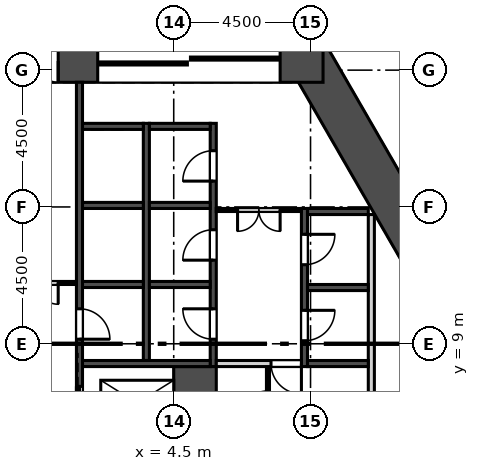
"""IFC4 building model, lengths in metres.
Left out: names, types, materials, properties, quantities, classifications, styles, units other than length and angle.
Written with IfcOpenShell. Run it as: python <this file> out.ifc"""

import sys

from ifc_helpers import new_model, si_unit, direction, frame, frame_2d, origin, place, context, subcontext, project, spatial, rectangle, extrude, element, fill, save


model = new_model("IFC4")
c1 = context("Model", 3, precision=1e-05, world=origin(), true_north=direction((0.0, 1.0)))
c2 = subcontext(c1, "Body", "Model", "MODEL_VIEW")
j1 = project(units=[si_unit("LENGTHUNIT", "METRE"), si_unit("PLANEANGLEUNIT", "RADIAN")], contexts=[c1])
p1 = place(None, origin())
s1 = spatial("IfcSite", under=j1, at=p1, CompositionType="ELEMENT")
p2 = place(p1, origin())
s2 = spatial("IfcBuilding", under=s1, at=p2, CompositionType="ELEMENT")
p3 = place(p2, frame((0.0, 0.0, 47.5)))
s3 = spatial("IfcBuildingStorey", under=s2, at=p3, CompositionType="ELEMENT", Elevation=47.5)
p4 = place(p3, frame((13.394, 10.703, 0.0), z_axis=(0.0, 0.0, 1.0), x_axis=(-0.50000187635, 0.866024320471, 0.0)))
e1 = element("IfcWall", 1, at=p4, inside=s3, PredefinedType="SHEAR", context=c2, shape_type="SweptSolid", body=[
    extrude(rectangle(XDim=9.177, YDim=1.4, at=frame_2d((4.588, 0.0))), origin(), (0.0, 0.0, 1.0), 5.4),
])
p5 = place(p3, frame((9.412, 18.3, 0.0), z_axis=(0.0, 0.0, 1.0), x_axis=(-1.0, 0.0, 0.0)))
e2 = element("IfcWall", 2, at=p5, inside=s3, PredefinedType="SHEAR", context=c2, shape_type="SweptSolid", body=[
    extrude(rectangle(XDim=18.823, YDim=1.4, at=frame_2d((9.412, 0.0))), origin(), (0.0, 0.0, 1.0), 5.4),
])
p6 = place(p5, frame((8.711, 0.0, 0.0)))
e3 = element("IfcOpeningElement", 3, at=p6, cuts=e2, PredefinedType="OPENING", context=c2, shape_type="SweptSolid", body=[
    extrude(rectangle(XDim=1.4, YDim=2.1, at=frame_2d((0.7, 1.05))), frame((0.0, 0.71, 0.0), z_axis=(0.0, -1.0, 0.0), x_axis=(1.0, 0.0, 0.0)), (0.0, 0.0, 1.0), 1.42),
])
p7 = place(p5, frame((11.412, 0.0, 0.0)))
e4 = element("IfcOpeningElement", 4, at=p7, cuts=e2, PredefinedType="OPENING", context=c2, shape_type="SweptSolid", body=[
    extrude(rectangle(XDim=6.0, YDim=2.4, at=frame_2d((3.0, 1.2))), frame((0.0, 0.71, 0.0), z_axis=(0.0, -1.0, 0.0), x_axis=(1.0, 0.0, 0.0)), (0.0, 0.0, 1.0), 1.42),
])
p8 = place(p5, frame((1.412, 0.0, 0.0)))
e5 = element("IfcOpeningElement", 5, at=p8, cuts=e2, PredefinedType="OPENING", context=c2, shape_type="SweptSolid", body=[
    extrude(rectangle(XDim=6.0, YDim=2.4, at=frame_2d((3.0, 1.2))), frame((0.0, 0.71, 0.0), z_axis=(0.0, -1.0, 0.0), x_axis=(1.0, 0.0, 0.0)), (0.0, 0.0, 1.0), 1.42),
])
p9 = place(p3, frame((31.98, 7.709, 0.0), z_axis=(0.0, 0.0, 1.0), x_axis=(-0.500000125387, 0.866025331392, 0.0)))
e6 = element("IfcWall", 6, at=p9, inside=s3, PredefinedType="SOLIDWALL", context=c2, shape_type="SweptSolid", body=[
    extrude(rectangle(XDim=55.255, YDim=0.34, at=frame_2d((27.628, 0.0))), origin(), (0.0, 0.0, 1.0), 5.1),
])
p10 = place(p9, frame((1.314, 0.0, 0.9)))
e7 = element("IfcOpeningElement", 7, at=p10, cuts=e6, PredefinedType="OPENING", context=c2, shape_type="SweptSolid", body=[
    extrude(rectangle(XDim=1.885, YDim=3.0, at=frame_2d((0.942, 1.5))), frame((0.0, 0.18, 0.0), z_axis=(0.0, -1.0, 0.0), x_axis=(1.0, 0.0, 0.0)), (0.0, 0.0, 1.0), 0.36),
])
p11 = place(p9, frame((4.314, 0.0, 0.9)))
e8 = element("IfcOpeningElement", 8, at=p11, cuts=e6, PredefinedType="OPENING", context=c2, shape_type="SweptSolid", body=[
    extrude(rectangle(XDim=1.885, YDim=3.0, at=frame_2d((0.942, 1.5))), frame((0.0, 0.18, 0.0), z_axis=(0.0, -1.0, 0.0), x_axis=(1.0, 0.0, 0.0)), (0.0, 0.0, 1.0), 0.36),
])
p12 = place(p9, frame((7.314, 0.0, 0.9)))
e9 = element("IfcOpeningElement", 9, at=p12, cuts=e6, PredefinedType="OPENING", context=c2, shape_type="SweptSolid", body=[
    extrude(rectangle(XDim=1.885, YDim=3.0, at=frame_2d((0.942, 1.5))), frame((0.0, 0.18, 0.0), z_axis=(0.0, -1.0, 0.0), x_axis=(1.0, 0.0, 0.0)), (0.0, 0.0, 1.0), 0.36),
])
p13 = place(p9, frame((10.314, 0.0, 0.9)))
e10 = element("IfcOpeningElement", 10, at=p13, cuts=e6, PredefinedType="OPENING", context=c2, shape_type="SweptSolid", body=[
    extrude(rectangle(XDim=1.885, YDim=3.0, at=frame_2d((0.942, 1.5))), frame((0.0, 0.18, 0.0), z_axis=(0.0, -1.0, 0.0), x_axis=(1.0, 0.0, 0.0)), (0.0, 0.0, 1.0), 0.36),
])
p14 = place(p9, frame((13.314, 0.0, 0.9)))
e11 = element("IfcOpeningElement", 11, at=p14, cuts=e6, PredefinedType="OPENING", context=c2, shape_type="SweptSolid", body=[
    extrude(rectangle(XDim=1.885, YDim=3.0, at=frame_2d((0.942, 1.5))), frame((0.0, 0.18, 0.0), z_axis=(0.0, -1.0, 0.0), x_axis=(1.0, 0.0, 0.0)), (0.0, 0.0, 1.0), 0.36),
])
p15 = place(p9, frame((16.314, 0.0, 0.9)))
e12 = element("IfcOpeningElement", 12, at=p15, cuts=e6, PredefinedType="OPENING", context=c2, shape_type="SweptSolid", body=[
    extrude(rectangle(XDim=1.885, YDim=3.0, at=frame_2d((0.942, 1.5))), frame((0.0, 0.18, 0.0), z_axis=(0.0, -1.0, 0.0), x_axis=(1.0, 0.0, 0.0)), (0.0, 0.0, 1.0), 0.36),
])
p16 = place(p9, frame((19.314, 0.0, 0.9)))
e13 = element("IfcOpeningElement", 13, at=p16, cuts=e6, PredefinedType="OPENING", context=c2, shape_type="SweptSolid", body=[
    extrude(rectangle(XDim=1.885, YDim=3.0, at=frame_2d((0.942, 1.5))), frame((0.0, 0.18, 0.0), z_axis=(0.0, -1.0, 0.0), x_axis=(1.0, 0.0, 0.0)), (0.0, 0.0, 1.0), 0.36),
])
p17 = place(p9, frame((22.314, 0.0, 0.9)))
e14 = element("IfcOpeningElement", 14, at=p17, cuts=e6, PredefinedType="OPENING", context=c2, shape_type="SweptSolid", body=[
    extrude(rectangle(XDim=1.885, YDim=3.0, at=frame_2d((0.942, 1.5))), frame((0.0, 0.18, 0.0), z_axis=(0.0, -1.0, 0.0), x_axis=(1.0, 0.0, 0.0)), (0.0, 0.0, 1.0), 0.36),
])
p18 = place(p9, frame((25.314, 0.0, 0.9)))
e15 = element("IfcOpeningElement", 15, at=p18, cuts=e6, PredefinedType="OPENING", context=c2, shape_type="SweptSolid", body=[
    extrude(rectangle(XDim=1.885, YDim=3.0, at=frame_2d((0.942, 1.5))), frame((0.0, 0.18, 0.0), z_axis=(0.0, -1.0, 0.0), x_axis=(1.0, 0.0, 0.0)), (0.0, 0.0, 1.0), 0.36),
])
p19 = place(p9, frame((28.314, 0.0, 0.9)))
e16 = element("IfcOpeningElement", 16, at=p19, cuts=e6, PredefinedType="OPENING", context=c2, shape_type="SweptSolid", body=[
    extrude(rectangle(XDim=1.885, YDim=3.0, at=frame_2d((0.942, 1.5))), frame((0.0, 0.18, 0.0), z_axis=(0.0, -1.0, 0.0), x_axis=(1.0, 0.0, 0.0)), (0.0, 0.0, 1.0), 0.36),
])
p20 = place(p9, frame((31.314, 0.0, 0.9)))
e17 = element("IfcOpeningElement", 17, at=p20, cuts=e6, PredefinedType="OPENING", context=c2, shape_type="SweptSolid", body=[
    extrude(rectangle(XDim=1.885, YDim=3.0, at=frame_2d((0.942, 1.5))), frame((0.0, 0.18, 0.0), z_axis=(0.0, -1.0, 0.0), x_axis=(1.0, 0.0, 0.0)), (0.0, 0.0, 1.0), 0.36),
])
p21 = place(p9, frame((34.314, 0.0, 0.9)))
e18 = element("IfcOpeningElement", 18, at=p21, cuts=e6, PredefinedType="OPENING", context=c2, shape_type="SweptSolid", body=[
    extrude(rectangle(XDim=1.885, YDim=3.0, at=frame_2d((0.942, 1.5))), frame((0.0, 0.18, 0.0), z_axis=(0.0, -1.0, 0.0), x_axis=(1.0, 0.0, 0.0)), (0.0, 0.0, 1.0), 0.36),
])
p22 = place(p9, frame((37.314, 0.0, 0.9)))
e19 = element("IfcOpeningElement", 19, at=p22, cuts=e6, PredefinedType="OPENING", context=c2, shape_type="SweptSolid", body=[
    extrude(rectangle(XDim=1.885, YDim=3.0, at=frame_2d((0.942, 1.5))), frame((0.0, 0.18, 0.0), z_axis=(0.0, -1.0, 0.0), x_axis=(1.0, 0.0, 0.0)), (0.0, 0.0, 1.0), 0.36),
])
p23 = place(p9, frame((40.314, 0.0, 0.9)))
e20 = element("IfcOpeningElement", 20, at=p23, cuts=e6, PredefinedType="OPENING", context=c2, shape_type="SweptSolid", body=[
    extrude(rectangle(XDim=1.885, YDim=3.0, at=frame_2d((0.942, 1.5))), frame((0.0, 0.18, 0.0), z_axis=(0.0, -1.0, 0.0), x_axis=(1.0, 0.0, 0.0)), (0.0, 0.0, 1.0), 0.36),
])
p24 = place(p9, frame((43.314, 0.0, 0.9)))
e21 = element("IfcOpeningElement", 21, at=p24, cuts=e6, PredefinedType="OPENING", context=c2, shape_type="SweptSolid", body=[
    extrude(rectangle(XDim=1.885, YDim=3.0, at=frame_2d((0.942, 1.5))), frame((0.0, 0.18, 0.0), z_axis=(0.0, -1.0, 0.0), x_axis=(1.0, 0.0, 0.0)), (0.0, 0.0, 1.0), 0.36),
])
p25 = place(p9, frame((46.314, 0.0, 0.9)))
e22 = element("IfcOpeningElement", 22, at=p25, cuts=e6, PredefinedType="OPENING", context=c2, shape_type="SweptSolid", body=[
    extrude(rectangle(XDim=1.885, YDim=3.0, at=frame_2d((0.942, 1.5))), frame((0.0, 0.18, 0.0), z_axis=(0.0, -1.0, 0.0), x_axis=(1.0, 0.0, 0.0)), (0.0, 0.0, 1.0), 0.36),
])
p26 = place(p9, frame((49.314, 0.0, 0.9)))
e23 = element("IfcOpeningElement", 23, at=p26, cuts=e6, PredefinedType="OPENING", context=c2, shape_type="SweptSolid", body=[
    extrude(rectangle(XDim=1.885, YDim=3.0, at=frame_2d((0.942, 1.5))), frame((0.0, 0.18, 0.0), z_axis=(0.0, -1.0, 0.0), x_axis=(1.0, 0.0, 0.0)), (0.0, 0.0, 1.0), 0.36),
])
p27 = place(p9, frame((52.314, 0.0, 0.9)))
e24 = element("IfcOpeningElement", 24, at=p27, cuts=e6, PredefinedType="OPENING", context=c2, shape_type="SweptSolid", body=[
    extrude(rectangle(XDim=1.885, YDim=3.0, at=frame_2d((0.942, 1.5))), frame((0.0, 0.18, 0.0), z_axis=(0.0, -1.0, 0.0), x_axis=(1.0, 0.0, 0.0)), (0.0, 0.0, 1.0), 0.36),
])
p28 = place(p3, frame((11.0, 5.85, 0.0), z_axis=(0.0, 0.0, 1.0), x_axis=(0.0, 1.0, 0.0)))
e25 = element("IfcWall", 25, at=p28, inside=s3, PredefinedType="SOLIDWALL", context=c2, shape_type="SweptSolid", body=[
    extrude(rectangle(XDim=7.4, YDim=0.2, at=frame_2d((3.7, 0.0))), origin(), (0.0, 0.0, 1.0), 5.1),
])
p29 = place(p3, frame((8.8, 8.25, -0.3), z_axis=(0.0, 0.0, 1.0), x_axis=(0.0, 1.0, 0.0)))
e26 = element("IfcWall", 26, at=p29, inside=s3, PredefinedType="SOLIDWALL", context=c2, shape_type="SweptSolid", body=[
    extrude(rectangle(XDim=5.2, YDim=0.2, at=frame_2d((2.6, 0.0))), origin(), (0.0, 0.0, 1.0), 5.4),
])
p30 = place(p29, frame((0.85, 0.0, 0.3)))
e27 = element("IfcOpeningElement", 27, at=p30, cuts=e26, PredefinedType="OPENING", context=c2, shape_type="SweptSolid", body=[
    extrude(rectangle(XDim=1.0, YDim=2.1, at=frame_2d((0.5, 1.05))), frame((0.0, 0.11, 0.0), z_axis=(0.0, -1.0, 0.0), x_axis=(1.0, 0.0, 0.0)), (0.0, 0.0, 1.0), 0.22),
])
p31 = place(p29, frame((3.35, 0.0, 0.3)))
e28 = element("IfcOpeningElement", 28, at=p31, cuts=e26, PredefinedType="OPENING", context=c2, shape_type="SweptSolid", body=[
    extrude(rectangle(XDim=1.0, YDim=2.1, at=frame_2d((0.5, 1.05))), frame((0.0, 0.11, 0.0), z_axis=(0.0, -1.0, 0.0), x_axis=(1.0, 0.0, 0.0)), (0.0, 0.0, 1.0), 0.22),
])
p32 = place(p3, frame((5.8, 8.25, -0.3), z_axis=(0.0, 0.0, 1.0), x_axis=(0.0, 1.0, 0.0)))
e29 = element("IfcWall", 29, at=p32, inside=s3, PredefinedType="SOLIDWALL", context=c2, shape_type="SweptSolid", body=[
    extrude(rectangle(XDim=8.0, YDim=0.2, at=frame_2d((4.0, 0.0))), origin(), (0.0, 0.0, 1.0), 5.4),
])
p33 = place(p32, frame((0.9, 0.0, 0.3)))
e30 = element("IfcOpeningElement", 30, at=p33, cuts=e29, PredefinedType="OPENING", context=c2, shape_type="SweptSolid", body=[
    extrude(rectangle(XDim=1.0, YDim=2.1, at=frame_2d((0.5, 1.05))), frame((0.0, 0.11, 0.0), z_axis=(0.0, -1.0, 0.0), x_axis=(1.0, 0.0, 0.0)), (0.0, 0.0, 1.0), 0.22),
])
p34 = place(p32, frame((3.5, 0.0, 0.3)))
e31 = element("IfcOpeningElement", 31, at=p34, cuts=e29, PredefinedType="OPENING", context=c2, shape_type="SweptSolid", body=[
    extrude(rectangle(XDim=1.0, YDim=2.1, at=frame_2d((0.5, 1.05))), frame((0.0, 0.11, 0.0), z_axis=(0.0, -1.0, 0.0), x_axis=(1.0, 0.0, 0.0)), (0.0, 0.0, 1.0), 0.22),
])
p35 = place(p32, frame((6.1, 0.0, 0.3)))
e32 = element("IfcOpeningElement", 32, at=p35, cuts=e29, PredefinedType="OPENING", context=c2, shape_type="SweptSolid", body=[
    extrude(rectangle(XDim=1.0, YDim=2.1, at=frame_2d((0.5, 1.05))), frame((0.0, 0.11, 0.0), z_axis=(0.0, -1.0, 0.0), x_axis=(1.0, 0.0, 0.0)), (0.0, 0.0, 1.0), 0.22),
])
p36 = place(p3, frame((3.6, 8.45, -0.3), z_axis=(0.0, 0.0, 1.0), x_axis=(0.0, 1.0, 0.0)))
e33 = element("IfcWall", 33, at=p36, inside=s3, PredefinedType="SOLIDWALL", context=c2, shape_type="SweptSolid", body=[
    extrude(rectangle(XDim=7.8, YDim=0.2, at=frame_2d((3.9, 0.0))), origin(), (0.0, 0.0, 1.0), 5.4),
])
p37 = place(p3, frame((1.4, 5.85, -0.3), z_axis=(0.0, 0.0, 1.0), x_axis=(0.0, 1.0, 0.0)))
e34 = element("IfcWall", 34, at=p37, inside=s3, PredefinedType="SOLIDWALL", context=c2, shape_type="SweptSolid", body=[
    extrude(rectangle(XDim=11.75, YDim=0.2, at=frame_2d((5.875, 0.0))), origin(), (0.0, 0.0, 1.0), 5.4),
])
p38 = place(p37, frame((0.65, 0.0, 0.3)))
e35 = element("IfcOpeningElement", 35, at=p38, cuts=e34, PredefinedType="OPENING", context=c2, shape_type="SweptSolid", body=[
    extrude(rectangle(XDim=1.1, YDim=2.1, at=frame_2d((0.55, 1.05))), frame((0.0, 0.11, 0.0), z_axis=(0.0, -1.0, 0.0), x_axis=(1.0, 0.0, 0.0)), (0.0, 0.0, 1.0), 0.22),
])
p39 = place(p37, frame((3.3, 0.0, 0.3)))
e36 = element("IfcOpeningElement", 36, at=p39, cuts=e34, PredefinedType="OPENING", context=c2, shape_type="SweptSolid", body=[
    extrude(rectangle(XDim=1.0, YDim=2.1, at=frame_2d((0.5, 1.05))), frame((0.0, 0.11, 0.0), z_axis=(0.0, -1.0, 0.0), x_axis=(1.0, 0.0, 0.0)), (0.0, 0.0, 1.0), 0.22),
])
p40 = place(p3, frame((5.2, 5.85, -0.3), z_axis=(0.0, 0.0, 1.0), x_axis=(0.0, 1.0, 0.0)))
e37 = element("IfcWall", 37, at=p40, inside=s3, PredefinedType="SOLIDWALL", context=c2, shape_type="SweptSolid", body=[
    extrude(rectangle(XDim=2.4, YDim=1.4, at=frame_2d((1.2, 0.0))), origin(), (0.0, 0.0, 1.0), 5.4),
])
p41 = place(p3, frame((8.9, 8.35, -0.3), z_axis=(0.0, 0.0, 1.0), x_axis=(1.0, 0.0, 0.0)))
e38 = element("IfcWall", 38, at=p41, inside=s3, PredefinedType="SOLIDWALL", context=c2, shape_type="SweptSolid", body=[
    extrude(rectangle(XDim=2.0, YDim=0.2, at=frame_2d((1.0, 0.0))), origin(), (0.0, 0.0, 1.0), 5.4),
])
p42 = place(p3, frame((1.5, 8.35, -0.3), z_axis=(0.0, 0.0, 1.0), x_axis=(1.0, 0.0, 0.0)))
e39 = element("IfcWall", 39, at=p42, inside=s3, PredefinedType="SOLIDWALL", context=c2, shape_type="SweptSolid", body=[
    extrude(rectangle(XDim=4.2, YDim=0.2, at=frame_2d((2.1, 0.0))), origin(), (0.0, 0.0, 1.0), 5.4),
])
for number, where, z_axis, x_axis in (
    (40, (8.9, 10.85, -0.3), (0.0, 0.0, 1.0), (1.0, 0.0, 0.0)),
    (41, (8.9, 13.35, -0.3), (0.0, 0.0, 1.0), (1.0, 0.0, 0.0)),
    (42, (3.7, 10.95, -0.3), (0.0, 0.0, 1.0), (1.0, 0.0, 0.0)),
    (43, (3.7, 13.55, -0.3), (0.0, 0.0, 1.0), (1.0, 0.0, 0.0)),
    (44, (3.7, 16.15, -0.3), (0.0, 0.0, 1.0), (1.0, 0.0, 0.0)),
    (45, (1.5, 10.95, -0.3), (0.0, 0.0, 1.0), (1.0, 0.0, 0.0)),
    (46, (1.5, 13.55, -0.3), (0.0, 0.0, 1.0), (1.0, 0.0, 0.0)),
    (47, (1.5, 16.15, -0.3), (0.0, 0.0, 1.0), (1.0, 0.0, 0.0)),
):
    element("IfcWall", number, at=place(p3, frame(where, z_axis=z_axis, x_axis=x_axis)), inside=s3, PredefinedType="SOLIDWALL", context=c2, shape_type="SweptSolid", body=[
        extrude(rectangle(XDim=2.0, YDim=0.2, at=frame_2d((1.0, 0.0))), origin(), (0.0, 0.0, 1.0), 5.4),
    ])
p43 = place(p3, frame((5.9, 13.4, 0.0), z_axis=(0.0, 0.0, 1.0), x_axis=(1.0, 0.0, 0.0)))
e48 = element("IfcWall", 48, at=p43, inside=s3, PredefinedType="PARTITIONING", context=c2, shape_type="SweptSolid", body=[
    extrude(rectangle(XDim=2.8, YDim=0.1, at=frame_2d((1.4, 0.0))), origin(), (0.0, 0.0, 1.0), 5.1),
])
p44 = place(p43, frame((0.7, 0.0, 0.0)))
e49 = element("IfcOpeningElement", 49, at=p44, cuts=e48, PredefinedType="OPENING", context=c2, shape_type="SweptSolid", body=[
    extrude(rectangle(XDim=1.4, YDim=2.1, at=frame_2d((0.7, 1.05))), frame((0.0, 0.06, 0.0), z_axis=(0.0, -1.0, 0.0), x_axis=(1.0, 0.0, 0.0)), (0.0, 0.0, 1.0), 0.12),
])
p45 = place(p3, frame((7.6, 5.85, 0.0), z_axis=(0.0, 0.0, 1.0), x_axis=(0.0, 1.0, 0.0)))
e50 = element("IfcWall", 50, at=p45, inside=s3, PredefinedType="PARTITIONING", context=c2, shape_type="SweptSolid", body=[
    extrude(rectangle(XDim=2.4, YDim=0.1, at=frame_2d((1.2, 0.0))), origin(), (0.0, 0.0, 1.0), 5.1),
])
p46 = place(p45, frame((0.7, 0.0, 0.0)))
e51 = element("IfcOpeningElement", 51, at=p46, cuts=e50, PredefinedType="OPENING", context=c2, shape_type="SweptSolid", body=[
    extrude(rectangle(XDim=0.9, YDim=2.1, at=frame_2d((0.45, 1.05))), frame((0.0, 0.06, 0.0), z_axis=(0.0, -1.0, 0.0), x_axis=(1.0, 0.0, 0.0)), (0.0, 0.0, 1.0), 0.12),
])
p47 = place(p3, frame((5.9, 8.35, 0.0), z_axis=(0.0, 0.0, 1.0), x_axis=(1.0, 0.0, 0.0)))
e52 = element("IfcWall", 52, at=p47, inside=s3, PredefinedType="SOLIDWALL", context=c2, shape_type="SweptSolid", body=[
    extrude(rectangle(XDim=2.8, YDim=0.2, at=frame_2d((1.4, 0.0))), origin(), (0.0, 0.0, 1.0), 5.1),
])
p48 = place(p47, frame((1.8, 0.0, 0.0)))
e53 = element("IfcOpeningElement", 53, at=p48, cuts=e52, PredefinedType="OPENING", context=c2, shape_type="SweptSolid", body=[
    extrude(rectangle(XDim=1.0, YDim=2.1, at=frame_2d((0.5, 1.05))), frame((0.0, 0.11, 0.0), z_axis=(0.0, -1.0, 0.0), x_axis=(1.0, 0.0, 0.0)), (0.0, 0.0, 1.0), 0.22),
])
p49 = place(p3, frame((-1.3, 11.0, 0.0), z_axis=(0.0, 0.0, 1.0), x_axis=(1.0, 0.0, 0.0)))
e54 = element("IfcWall", 54, at=p49, inside=s3, PredefinedType="PARTITIONING", context=c2, shape_type="SweptSolid", body=[
    extrude(rectangle(XDim=2.6, YDim=0.1, at=frame_2d((1.3, 0.0))), origin(), (0.0, 0.0, 1.0), 5.1),
])
p50 = place(p49, frame((0.6, 0.0, 0.0)))
e55 = element("IfcOpeningElement", 55, at=p50, cuts=e54, PredefinedType="OPENING", context=c2, shape_type="SweptSolid", body=[
    extrude(rectangle(XDim=1.4, YDim=2.1, at=frame_2d((0.7, 1.05))), frame((0.0, 0.06, 0.0), z_axis=(0.0, -1.0, 0.0), x_axis=(1.0, 0.0, 0.0)), (0.0, 0.0, 1.0), 0.12),
])
p51 = place(p3, frame((11.736, 22.275, 0.0), z_axis=(0.0, 0.0, 1.0), x_axis=(0.499992738267, -0.866029596307, 0.0)))
e56 = element("IfcWall", 56, at=p51, inside=s3, PredefinedType="SOLIDWALL", context=c2, shape_type="SweptSolid", body=[
    extrude(rectangle(XDim=11.624, YDim=0.3, at=frame_2d((5.812, 0.0))), origin(), (0.0, 0.0, 1.0), 5.1),
])
p52 = place(p38, origin())
e57 = element("IfcDoor", 57, at=p52, inside=s3, OperationType="SLIDING_TO_RIGHT", PredefinedType="DOOR", context=c2, shape_type="SweptSolid", body=[
    extrude(rectangle(XDim=1.1, YDim=2.1, at=frame_2d((0.55, 1.05))), frame((0.0, 0.025, 0.0), z_axis=(0.0, -1.0, 0.0), x_axis=(1.0, 0.0, 0.0)), (0.0, 0.0, 1.0), 0.05),
])
fill(e35, e57)
p53 = place(p30, frame((1.0, 0.0, 0.0), z_axis=(0.0, 0.0, 1.0), x_axis=(-1.0, 0.0, 0.0)))
e58 = element("IfcDoor", 58, at=p53, inside=s3, OperationType="SINGLE_SWING_LEFT", PredefinedType="DOOR", context=c2, shape_type="SweptSolid", body=[
    extrude(rectangle(XDim=1.0, YDim=2.1, at=frame_2d((0.5, 1.05))), frame((0.0, 0.025, 0.0), z_axis=(0.0, -1.0, 0.0), x_axis=(1.0, 0.0, 0.0)), (0.0, 0.0, 1.0), 0.05),
])
fill(e27, e58)
p54 = place(p31, frame((1.0, 0.0, 0.0), z_axis=(0.0, 0.0, 1.0), x_axis=(-1.0, 0.0, 0.0)))
e59 = element("IfcDoor", 59, at=p54, inside=s3, OperationType="SINGLE_SWING_LEFT", PredefinedType="DOOR", context=c2, shape_type="SweptSolid", body=[
    extrude(rectangle(XDim=1.0, YDim=2.1, at=frame_2d((0.5, 1.05))), frame((0.0, 0.025, 0.0), z_axis=(0.0, -1.0, 0.0), x_axis=(1.0, 0.0, 0.0)), (0.0, 0.0, 1.0), 0.05),
])
fill(e28, e59)
p55 = place(p33, origin())
e60 = element("IfcDoor", 60, at=p55, inside=s3, OperationType="SINGLE_SWING_RIGHT", PredefinedType="DOOR", context=c2, shape_type="SweptSolid", body=[
    extrude(rectangle(XDim=1.0, YDim=2.1, at=frame_2d((0.5, 1.05))), frame((0.0, 0.025, 0.0), z_axis=(0.0, -1.0, 0.0), x_axis=(1.0, 0.0, 0.0)), (0.0, 0.0, 1.0), 0.05),
])
fill(e30, e60)
p56 = place(p34, origin())
e61 = element("IfcDoor", 61, at=p56, inside=s3, OperationType="SINGLE_SWING_LEFT", PredefinedType="DOOR", context=c2, shape_type="SweptSolid", body=[
    extrude(rectangle(XDim=1.0, YDim=2.1, at=frame_2d((0.5, 1.05))), frame((0.0, 0.025, 0.0), z_axis=(0.0, -1.0, 0.0), x_axis=(1.0, 0.0, 0.0)), (0.0, 0.0, 1.0), 0.05),
])
fill(e31, e61)
p57 = place(p35, origin())
e62 = element("IfcDoor", 62, at=p57, inside=s3, OperationType="SINGLE_SWING_LEFT", PredefinedType="DOOR", context=c2, shape_type="SweptSolid", body=[
    extrude(rectangle(XDim=1.0, YDim=2.1, at=frame_2d((0.5, 1.05))), frame((0.0, 0.025, 0.0), z_axis=(0.0, -1.0, 0.0), x_axis=(1.0, 0.0, 0.0)), (0.0, 0.0, 1.0), 0.05),
])
fill(e32, e62)
p58 = place(p39, frame((1.0, 0.0, 0.0), z_axis=(0.0, 0.0, 1.0), x_axis=(-1.0, 0.0, 0.0)))
e63 = element("IfcDoor", 63, at=p58, inside=s3, OperationType="SINGLE_SWING_RIGHT", PredefinedType="DOOR", context=c2, shape_type="SweptSolid", body=[
    extrude(rectangle(XDim=1.0, YDim=2.1, at=frame_2d((0.5, 1.05))), frame((0.0, 0.025, 0.0), z_axis=(0.0, -1.0, 0.0), x_axis=(1.0, 0.0, 0.0)), (0.0, 0.0, 1.0), 0.05),
])
fill(e36, e63)
p59 = place(p44, frame((1.4, 0.0, 0.0), z_axis=(0.0, 0.0, 1.0), x_axis=(-1.0, 0.0, 0.0)))
e64 = element("IfcDoor", 64, at=p59, inside=s3, OperationType="DOUBLE_DOOR_SINGLE_SWING", PredefinedType="DOOR", context=c2, shape_type="SweptSolid", body=[
    extrude(rectangle(XDim=1.4, YDim=2.1, at=frame_2d((0.7, 1.05))), frame((0.0, 0.025, 0.0), z_axis=(0.0, -1.0, 0.0), x_axis=(1.0, 0.0, 0.0)), (0.0, 0.0, 1.0), 0.05),
])
fill(e49, e64)
p60 = place(p48, frame((1.0, 0.0, 0.0), z_axis=(0.0, 0.0, 1.0), x_axis=(-1.0, 0.0, 0.0)))
e65 = element("IfcDoor", 65, at=p60, inside=s3, OperationType="SINGLE_SWING_LEFT", PredefinedType="DOOR", context=c2, shape_type="SweptSolid", body=[
    extrude(rectangle(XDim=1.0, YDim=2.1, at=frame_2d((0.5, 1.05))), frame((0.0, 0.025, 0.0), z_axis=(0.0, -1.0, 0.0), x_axis=(1.0, 0.0, 0.0)), (0.0, 0.0, 1.0), 0.05),
])
fill(e53, e65)
p61 = place(p50, frame((1.4, 0.0, 0.0), z_axis=(0.0, 0.0, 1.0), x_axis=(-1.0, 0.0, 0.0)))
e66 = element("IfcDoor", 66, at=p61, inside=s3, OperationType="DOUBLE_DOOR_SINGLE_SWING", PredefinedType="DOOR", context=c2, shape_type="SweptSolid", body=[
    extrude(rectangle(XDim=1.4, YDim=2.1, at=frame_2d((0.7, 1.05))), frame((0.0, 0.025, 0.0), z_axis=(0.0, -1.0, 0.0), x_axis=(1.0, 0.0, 0.0)), (0.0, 0.0, 1.0), 0.05),
])
fill(e55, e66)
p62 = place(p6, origin())
e67 = element("IfcDoor", 67, at=p62, inside=s3, OperationType="DOUBLE_DOOR_SINGLE_SWING", PredefinedType="DOOR", context=c2, shape_type="SweptSolid", body=[
    extrude(rectangle(XDim=1.4, YDim=2.1, at=frame_2d((0.7, 1.05))), frame((0.0, 0.025, 0.0), z_axis=(0.0, -1.0, 0.0), x_axis=(1.0, 0.0, 0.0)), (0.0, 0.0, 1.0), 0.05),
])
fill(e3, e67)
p63 = place(p8, origin())
e68 = element("IfcDoor", 68, at=p63, inside=s3, OperationType="DOUBLE_DOOR_SLIDING", PredefinedType="DOOR", context=c2, shape_type="SweptSolid", body=[
    extrude(rectangle(XDim=6.0, YDim=2.4, at=frame_2d((3.0, 1.2))), frame((0.0, 0.025, 0.0), z_axis=(0.0, -1.0, 0.0), x_axis=(1.0, 0.0, 0.0)), (0.0, 0.0, 1.0), 0.05),
])
fill(e5, e68)
save(model, sys.argv[1])
